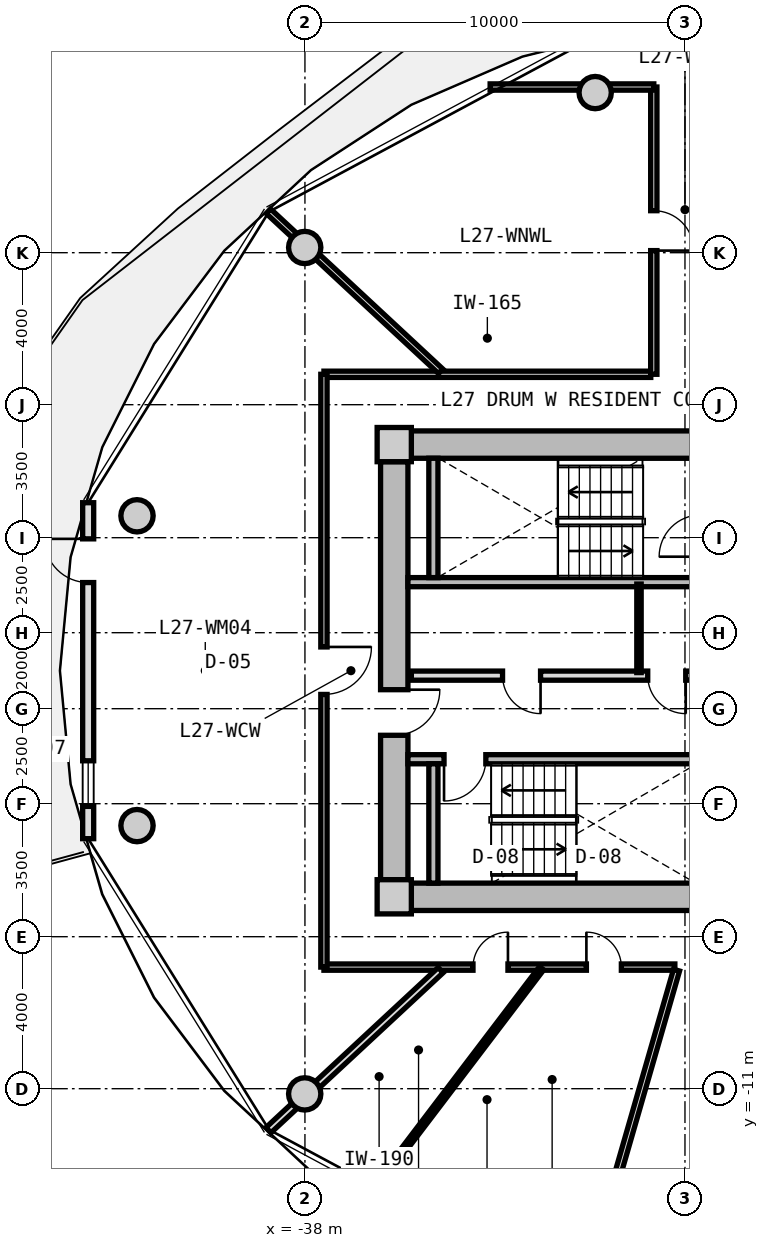
"""IFC4 building model, lengths in metres.
Left out: names, types, materials, properties, quantities, classifications, styles, units other than length and angle.
Written with IfcOpenShell. Run it as: python <this file> out.ifc"""

import sys

from ifc_helpers import new_model, si_unit, direction, frame, frame_2d, origin, origin_2d, place, context, subcontext, project, spatial, rectangle, circle, extrude, source, transform, mapped, element, fill, save


model = new_model("IFC4")
c1 = context("Model", 3, precision=1e-05, world=origin(), true_north=direction((0.0, 1.0)))
c2 = subcontext(c1, "Body", "Model", "MODEL_VIEW")
j1 = project(units=[si_unit("LENGTHUNIT", "METRE"), si_unit("PLANEANGLEUNIT", "RADIAN")], contexts=[c1])
p1 = place(None, origin())
s1 = spatial("IfcSite", under=j1, at=p1, CompositionType="ELEMENT")
p2 = place(p1, origin())
s2 = spatial("IfcBuilding", under=s1, at=p2, CompositionType="ELEMENT")
p3 = place(p2, frame((0.0, 0.0, 90.15)))
s3 = spatial("IfcBuildingStorey", under=s2, at=p3, CompositionType="ELEMENT", Elevation=90.15)
m1 = source(origin(), c2, "Body", "SweptSolid", [
    extrude(rectangle(XDim=0.9, YDim=0.9, at=origin_2d()), origin(), (0.0, 0.0, 1.0), 3.05),
])
for number, where, z_axis, x_axis in (
    (1, (-35.65, -5.95, 0.0), (0.0, 0.0, 1.0), (1.0, 0.0, 0.0)),
    (2, (-35.65, 5.95, 0.0), (0.0, 0.0, 1.0), (1.0, 0.0, 0.0)),
):
    element("IfcColumn", number, at=place(p3, frame(where, z_axis=z_axis, x_axis=x_axis)), inside=s3, PredefinedType="COLUMN", context=c2, shape_type="MappedRepresentation", body=[
        mapped(m1, transform((0.0, 0.0, 0.0), x_axis=(1.0, 0.0, 0.0), y_axis=(0.0, 1.0, 0.0), z_axis=(0.0, 0.0, 1.0), scale=1.0)),
    ])
m2 = source(origin(), c2, "Body", "SweptSolid", [
    extrude(rectangle(XDim=14.4, YDim=0.72, at=frame_2d((7.2, 0.0))), origin(), (0.0, 0.0, 1.0), 2.79),
])
for number, where, z_axis, x_axis in (
    (3, (-35.2, 5.95, 0.0), (0.0, 0.0, 1.0), (1.0, 0.0, 0.0)),
    (4, (-20.8, -5.95, 0.0), (0.0, 0.0, 1.0), (-1.0, 0.0, 0.0)),
):
    element("IfcWall", number, at=place(p3, frame(where, z_axis=z_axis, x_axis=x_axis)), inside=s3, PredefinedType="SHEAR", context=c2, shape_type="MappedRepresentation", body=[
        mapped(m2, transform((0.0, 0.0, 0.0), x_axis=(1.0, 0.0, 0.0), y_axis=(0.0, 1.0, 0.0), z_axis=(0.0, 0.0, 1.0), scale=1.0)),
    ])
m3 = source(origin(), c2, "Body", "SweptSolid", [
    extrude(rectangle(XDim=11.0, YDim=0.72, at=frame_2d((5.5, 0.0))), origin(), (0.0, 0.0, 1.0), 2.79),
])
p4 = place(p3, frame((-35.65, -5.5, 0.0), z_axis=(0.0, 0.0, 1.0), x_axis=(0.0, 1.0, 0.0)))
e5 = element("IfcWall", 5, at=p4, inside=s3, PredefinedType="SHEAR", context=c2, shape_type="MappedRepresentation", body=[
    mapped(m3, transform((0.0, 0.0, 0.0), x_axis=(1.0, 0.0, 0.0), y_axis=(0.0, 1.0, 0.0), z_axis=(0.0, 0.0, 1.0), scale=1.0)),
])
p5 = place(p4, frame((3.8, 0.0, 0.0)))
e6 = element("IfcOpeningElement", 6, at=p5, cuts=e5, PredefinedType="OPENING", context=c2, shape_type="SweptSolid", body=[
    extrude(rectangle(XDim=1.2, YDim=2.15, at=frame_2d((0.6, 1.075))), frame((0.0, 0.37, 0.0), z_axis=(0.0, -1.0, 0.0), x_axis=(1.0, 0.0, 0.0)), (0.0, 0.0, 1.0), 0.74),
])
m4 = source(origin(), c2, "Body", "SweptSolid", [
    extrude(circle(Radius=0.425, at=origin_2d()), origin(), (0.0, 0.0, 1.0), 3.05),
])
for number, where, z_axis, x_axis in (
    (7, (-30.363, 15.213, 0.0), (0.0, 0.0, 1.0), (1.0, 0.0, 0.0)),
    (8, (-38.006, 11.137, 0.0), (0.0, 0.0, 1.0), (1.0, 0.0, 0.0)),
    (9, (-42.419, 4.076, 0.0), (0.0, 0.0, 1.0), (1.0, 0.0, 0.0)),
    (10, (-42.419, -4.076, 0.0), (0.0, 0.0, 1.0), (1.0, 0.0, 0.0)),
    (11, (-38.006, -11.137, 0.0), (0.0, 0.0, 1.0), (1.0, 0.0, 0.0)),
):
    element("IfcColumn", number, at=place(p3, frame(where, z_axis=z_axis, x_axis=x_axis)), inside=s3, PredefinedType="COLUMN", context=c2, shape_type="MappedRepresentation", body=[
        mapped(m4, transform((0.0, 0.0, 0.0), x_axis=(1.0, 0.0, 0.0), y_axis=(0.0, 1.0, 0.0), z_axis=(0.0, 0.0, 1.0), scale=1.0)),
    ])
m5 = source(origin(), c2, "Body", "SweptSolid", [
    extrude(rectangle(XDim=8.841, YDim=0.29, at=frame_2d((4.421, 0.0))), origin(), (0.0, 0.0, 1.0), 2.79),
])
p6 = place(p3, frame((-43.704, -4.421, 0.0), z_axis=(0.0, 0.0, 1.0), x_axis=(0.0, 1.0, 0.0)))
e12 = element("IfcWall", 12, at=p6, inside=s3, PredefinedType="SOLIDWALL", context=c2, shape_type="MappedRepresentation", body=[
    mapped(m5, transform((0.0, 0.0, 0.0), x_axis=(1.0, 0.0, 0.0), y_axis=(0.0, 1.0, 0.0), z_axis=(0.0, 0.0, 1.0), scale=1.0)),
])
p7 = place(p6, frame((6.74, 0.0, 0.0)))
e13 = element("IfcOpeningElement", 13, at=p7, cuts=e12, PredefinedType="OPENING", context=c2, shape_type="SweptSolid", body=[
    extrude(rectangle(XDim=1.15, YDim=2.25, at=frame_2d((0.575, 1.125))), frame((0.0, 0.155, 0.0), z_axis=(0.0, -1.0, 0.0), x_axis=(1.0, 0.0, 0.0)), (0.0, 0.0, 1.0), 0.31),
])
p8 = place(p6, frame((0.85, 0.0, 0.85)))
e14 = element("IfcOpeningElement", 14, at=p8, cuts=e12, PredefinedType="OPENING", context=c2, shape_type="SweptSolid", body=[
    extrude(rectangle(XDim=1.2, YDim=1.5, at=frame_2d((0.6, 0.75))), frame((0.0, 0.155, 0.0), z_axis=(0.0, -1.0, 0.0), x_axis=(1.0, 0.0, 0.0)), (0.0, 0.0, 1.0), 0.31),
])
m6 = source(origin(), c2, "Body", "SweptSolid", [
    extrude(rectangle(XDim=7.83, YDim=0.24, at=frame_2d((3.915, 0.0))), origin(), (0.0, 0.0, 1.0), 2.79),
])
p9 = place(p3, frame((-35.29, 2.33, 0.0), z_axis=(0.0, 0.0, 1.0), x_axis=(1.0, 0.0, 0.0)))
e15 = element("IfcWall", 15, at=p9, inside=s3, PredefinedType="PARTITIONING", context=c2, shape_type="MappedRepresentation", body=[
    mapped(m6, transform((0.0, 0.0, 0.0), x_axis=(1.0, 0.0, 0.0), y_axis=(0.0, 1.0, 0.0), z_axis=(0.0, 0.0, 1.0), scale=1.0)),
])
m7 = source(origin(), c2, "Body", "SweptSolid", [
    extrude(rectangle(XDim=3.14, YDim=0.24, at=frame_2d((1.57, 0.0))), origin(), (0.0, 0.0, 1.0), 2.79),
])
p10 = place(p3, frame((-34.62, 2.45, 0.0), z_axis=(0.0, 0.0, 1.0), x_axis=(0.0, 1.0, 0.0)))
e16 = element("IfcWall", 16, at=p10, inside=s3, PredefinedType="PARTITIONING", context=c2, shape_type="MappedRepresentation", body=[
    mapped(m7, transform((0.0, 0.0, 0.0), x_axis=(1.0, 0.0, 0.0), y_axis=(0.0, 1.0, 0.0), z_axis=(0.0, 0.0, 1.0), scale=1.0)),
])
p11 = place(p3, frame((-35.29, -2.33, 0.0), z_axis=(0.0, 0.0, 1.0), x_axis=(1.0, 0.0, 0.0)))
e17 = element("IfcWall", 17, at=p11, inside=s3, PredefinedType="PARTITIONING", context=c2, shape_type="MappedRepresentation", body=[
    mapped(m6, transform((0.0, 0.0, 0.0), x_axis=(1.0, 0.0, 0.0), y_axis=(0.0, 1.0, 0.0), z_axis=(0.0, 0.0, 1.0), scale=1.0)),
])
p12 = place(p11, frame((0.95, 0.0, 0.0)))
e18 = element("IfcOpeningElement", 18, at=p12, cuts=e17, PredefinedType="OPENING", context=c2, shape_type="SweptSolid", body=[
    extrude(rectangle(XDim=1.1, YDim=2.15, at=frame_2d((0.55, 1.075))), frame((0.0, 0.13, 0.0), z_axis=(0.0, -1.0, 0.0), x_axis=(1.0, 0.0, 0.0)), (0.0, 0.0, 1.0), 0.26),
])
p13 = place(p3, frame((-34.62, -5.59, 0.0), z_axis=(0.0, 0.0, 1.0), x_axis=(0.0, 1.0, 0.0)))
e19 = element("IfcWall", 19, at=p13, inside=s3, PredefinedType="PARTITIONING", context=c2, shape_type="MappedRepresentation", body=[
    mapped(m7, transform((0.0, 0.0, 0.0), x_axis=(1.0, 0.0, 0.0), y_axis=(0.0, 1.0, 0.0), z_axis=(0.0, 0.0, 1.0), scale=1.0)),
])
m8 = source(origin(), c2, "Body", "SweptSolid", [
    extrude(rectangle(XDim=7.62, YDim=0.24, at=frame_2d((3.81, 0.0))), origin(), (0.0, 0.0, 1.0), 2.775),
])
p14 = place(p3, frame((-35.2, -0.13, 0.0), z_axis=(0.0, 0.0, 1.0), x_axis=(1.0, 0.0, 0.0)))
e20 = element("IfcWall", 20, at=p14, inside=s3, PredefinedType="PARTITIONING", context=c2, shape_type="MappedRepresentation", body=[
    mapped(m8, transform((0.0, 0.0, 0.0), x_axis=(1.0, 0.0, 0.0), y_axis=(0.0, 1.0, 0.0), z_axis=(0.0, 0.0, 1.0), scale=1.0)),
])
p15 = place(p14, frame((6.22, 0.0, 0.0)))
e21 = element("IfcOpeningElement", 21, at=p15, cuts=e20, PredefinedType="OPENING", context=c2, shape_type="SweptSolid", body=[
    extrude(rectangle(XDim=1.0, YDim=2.1, at=frame_2d((0.5, 1.05))), frame((0.0, 0.13, 0.0), z_axis=(0.0, -1.0, 0.0), x_axis=(1.0, 0.0, 0.0)), (0.0, 0.0, 1.0), 0.26),
])
p16 = place(p14, frame((2.4, 0.0, 0.0)))
e22 = element("IfcOpeningElement", 22, at=p16, cuts=e20, PredefinedType="OPENING", context=c2, shape_type="SweptSolid", body=[
    extrude(rectangle(XDim=1.0, YDim=2.1, at=frame_2d((0.5, 1.05))), frame((0.0, 0.13, 0.0), z_axis=(0.0, -1.0, 0.0), x_axis=(1.0, 0.0, 0.0)), (0.0, 0.0, 1.0), 0.26),
])
m9 = source(origin(), c2, "Body", "SweptSolid", [
    extrude(rectangle(XDim=2.33, YDim=0.115, at=frame_2d((1.165, 0.0))), origin(), (0.0, 0.0, 1.0), 2.775),
])
p17 = place(p3, frame((-29.21, -0.05, 0.0), z_axis=(0.0, 0.0, 1.0), x_axis=(0.0, 1.0, 0.0)))
e23 = element("IfcWall", 23, at=p17, inside=s3, PredefinedType="PARTITIONING", context=c2, shape_type="MappedRepresentation", body=[
    mapped(m9, transform((0.0, 0.0, 0.0), x_axis=(1.0, 0.0, 0.0), y_axis=(0.0, 1.0, 0.0), z_axis=(0.0, 0.0, 1.0), scale=1.0)),
])
m10 = source(origin(), c2, "Body", "SweptSolid", [
    extrude(rectangle(XDim=8.6, YDim=0.165, at=frame_2d((4.3, 0.0))), origin(), (0.0, 0.0, 1.0), 2.775),
])
p18 = place(p3, frame((-37.5, 7.8, 0.0), z_axis=(0.0, 0.0, 1.0), x_axis=(1.0, 0.0, 0.0)))
e24 = element("IfcWall", 24, at=p18, inside=s3, PredefinedType="PARTITIONING", context=c2, shape_type="MappedRepresentation", body=[
    mapped(m10, transform((0.0, 0.0, 0.0), x_axis=(1.0, 0.0, 0.0), y_axis=(0.0, 1.0, 0.0), z_axis=(0.0, 0.0, 1.0), scale=1.0)),
])
m11 = source(origin(), c2, "Body", "SweptSolid", [
    extrude(rectangle(XDim=9.234, YDim=0.165, at=frame_2d((4.617, 0.0))), origin(), (0.0, 0.0, 1.0), 2.775),
])
p19 = place(p3, frame((-28.266, -7.8, 0.0), z_axis=(0.0, 0.0, 1.0), x_axis=(-1.0, 0.0, 0.0)))
e25 = element("IfcWall", 25, at=p19, inside=s3, PredefinedType="PARTITIONING", context=c2, shape_type="MappedRepresentation", body=[
    mapped(m11, transform((0.0, 0.0, 0.0), x_axis=(1.0, 0.0, 0.0), y_axis=(0.0, 1.0, 0.0), z_axis=(0.0, 0.0, 1.0), scale=1.0)),
])
p20 = place(p19, frame((4.392, 0.0, 0.0)))
e26 = element("IfcOpeningElement", 26, at=p20, cuts=e25, PredefinedType="OPENING", context=c2, shape_type="SweptSolid", body=[
    extrude(rectangle(XDim=0.92, YDim=2.1, at=frame_2d((0.46, 1.05))), frame((0.0, 0.093, 0.0), z_axis=(0.0, -1.0, 0.0), x_axis=(1.0, 0.0, 0.0)), (0.0, 0.0, 1.0), 0.185),
])
p21 = place(p19, frame((1.408, 0.0, 0.0)))
e27 = element("IfcOpeningElement", 27, at=p21, cuts=e25, PredefinedType="OPENING", context=c2, shape_type="SweptSolid", body=[
    extrude(rectangle(XDim=0.92, YDim=2.1, at=frame_2d((0.46, 1.05))), frame((0.0, 0.093, 0.0), z_axis=(0.0, -1.0, 0.0), x_axis=(1.0, 0.0, 0.0)), (0.0, 0.0, 1.0), 0.185),
])
m12 = source(origin(), c2, "Body", "SweptSolid", [
    extrude(rectangle(XDim=15.6, YDim=0.165, at=frame_2d((7.8, 0.0))), origin(), (0.0, 0.0, 1.0), 2.775),
])
p22 = place(p3, frame((-37.5, -7.8, 0.0), z_axis=(0.0, 0.0, 1.0), x_axis=(0.0, 1.0, 0.0)))
e28 = element("IfcWall", 28, at=p22, inside=s3, PredefinedType="PARTITIONING", context=c2, shape_type="MappedRepresentation", body=[
    mapped(m12, transform((0.0, 0.0, 0.0), x_axis=(1.0, 0.0, 0.0), y_axis=(0.0, 1.0, 0.0), z_axis=(0.0, 0.0, 1.0), scale=1.0)),
])
p23 = place(p22, frame((7.175, 0.0, 0.0)))
e29 = element("IfcOpeningElement", 29, at=p23, cuts=e28, PredefinedType="OPENING", context=c2, shape_type="SweptSolid", body=[
    extrude(rectangle(XDim=1.25, YDim=2.2, at=frame_2d((0.625, 1.1))), frame((0.0, 0.093, 0.0), z_axis=(0.0, -1.0, 0.0), x_axis=(1.0, 0.0, 0.0)), (0.0, 0.0, 1.0), 0.185),
])
m13 = source(origin(), c2, "Body", "SweptSolid", [
    extrude(rectangle(XDim=6.187, YDim=0.165, at=frame_2d((3.093, 0.0))), origin(), (0.0, 0.0, 1.0), 2.275),
])
p24 = place(p3, frame((-34.429, 7.88, 0.0), z_axis=(0.0, 0.0, 1.0), x_axis=(-0.732501077882, 0.680765870841, 0.0)))
e30 = element("IfcWall", 30, at=p24, inside=s3, PredefinedType="PARTITIONING", context=c2, shape_type="MappedRepresentation", body=[
    mapped(m13, transform((0.0, 0.0, 0.0), x_axis=(1.0, 0.0, 0.0), y_axis=(0.0, 1.0, 0.0), z_axis=(0.0, 0.0, 1.0), scale=1.0)),
])
m14 = source(origin(), c2, "Body", "SweptSolid", [
    extrude(rectangle(XDim=8.989, YDim=0.165, at=frame_2d((4.495, 0.0))), origin(), (0.0, 0.0, 1.0), 2.275),
])
p25 = place(p3, frame((-28.222, -7.88, 0.0), z_axis=(0.0, 0.0, 1.0), x_axis=(-0.27702323008, -0.960863221274, 0.0)))
e31 = element("IfcWall", 31, at=p25, inside=s3, PredefinedType="PARTITIONING", context=c2, shape_type="MappedRepresentation", body=[
    mapped(m14, transform((0.0, 0.0, 0.0), x_axis=(1.0, 0.0, 0.0), y_axis=(0.0, 1.0, 0.0), z_axis=(0.0, 0.0, 1.0), scale=1.0)),
])
m15 = source(origin(), c2, "Body", "SweptSolid", [
    extrude(rectangle(XDim=7.56, YDim=0.165, at=frame_2d((3.78, 0.0))), origin(), (0.0, 0.0, 1.0), 2.775),
])
p26 = place(p3, frame((-28.82, 7.8, 0.0), z_axis=(0.0, 0.0, 1.0), x_axis=(0.0, 1.0, 0.0)))
e32 = element("IfcWall", 32, at=p26, inside=s3, PredefinedType="PARTITIONING", context=c2, shape_type="MappedRepresentation", body=[
    mapped(m15, transform((0.0, 0.0, 0.0), x_axis=(1.0, 0.0, 0.0), y_axis=(0.0, 1.0, 0.0), z_axis=(0.0, 0.0, 1.0), scale=1.0)),
])
p27 = place(p26, frame((3.255, 0.0, 0.0)))
e33 = element("IfcOpeningElement", 33, at=p27, cuts=e32, PredefinedType="OPENING", context=c2, shape_type="SweptSolid", body=[
    extrude(rectangle(XDim=1.05, YDim=2.15, at=frame_2d((0.525, 1.075))), frame((0.0, 0.093, 0.0), z_axis=(0.0, -1.0, 0.0), x_axis=(1.0, 0.0, 0.0)), (0.0, 0.0, 1.0), 0.185),
])
m16 = source(origin(), c2, "Body", "SweptSolid", [
    extrude(rectangle(XDim=4.307, YDim=0.165, at=frame_2d((2.153, 0.0))), origin(), (0.0, 0.0, 1.0), 2.275),
])
p28 = place(p3, frame((-33.127, 15.36, 0.0), z_axis=(0.0, 0.0, 1.0), x_axis=(1.0, 0.0, 0.0)))
e34 = element("IfcWall", 34, at=p28, inside=s3, PredefinedType="PARTITIONING", context=c2, shape_type="MappedRepresentation", body=[
    mapped(m16, transform((0.0, 0.0, 0.0), x_axis=(1.0, 0.0, 0.0), y_axis=(0.0, 1.0, 0.0), z_axis=(0.0, 0.0, 1.0), scale=1.0)),
])
m17 = source(origin(), c2, "Body", "SweptSolid", [
    extrude(rectangle(XDim=6.187, YDim=0.19, at=frame_2d((3.093, 0.0))), origin(), (0.0, 0.0, 1.0), 2.275),
])
p29 = place(p3, frame((-34.429, -7.88, 0.0), z_axis=(0.0, 0.0, 1.0), x_axis=(-0.732501077882, -0.680765870841, 0.0)))
e35 = element("IfcWall", 35, at=p29, inside=s3, PredefinedType="PARTITIONING", context=c2, shape_type="MappedRepresentation", body=[
    mapped(m17, transform((0.0, 0.0, 0.0), x_axis=(1.0, 0.0, 0.0), y_axis=(0.0, 1.0, 0.0), z_axis=(0.0, 0.0, 1.0), scale=1.0)),
])
m18 = source(origin(), c2, "Body", "SweptSolid", [
    extrude(rectangle(XDim=7.243, YDim=0.14, at=frame_2d((3.621, 0.0))), origin(), (0.0, 0.0, 1.0), 2.775),
])
p30 = place(p3, frame((-31.774, -7.83, 0.0), z_axis=(0.0, 0.0, 1.0), x_axis=(-0.605111472002, -0.796140757939, 0.0)))
e36 = element("IfcWall", 36, at=p30, inside=s3, PredefinedType="PARTITIONING", context=c2, shape_type="MappedRepresentation", body=[
    mapped(m18, transform((0.0, 0.0, 0.0), x_axis=(1.0, 0.0, 0.0), y_axis=(0.0, 1.0, 0.0), z_axis=(0.0, 0.0, 1.0), scale=1.0)),
])
m19 = source(origin(), c2, "Body", "SweptSolid", [
    extrude(rectangle(XDim=1.15, YDim=2.25, at=frame_2d((0.575, 1.125))), frame((0.0, 0.025, 0.0), z_axis=(0.0, -1.0, 0.0), x_axis=(1.0, 0.0, 0.0)), (0.0, 0.0, 1.0), 0.05),
])
p31 = place(p7, origin())
e37 = element("IfcDoor", 37, at=p31, inside=s3, OperationType="SINGLE_SWING_RIGHT", PredefinedType="DOOR", context=c2, shape_type="MappedRepresentation", body=[
    mapped(m19, transform((0.0, 0.0, 0.0), x_axis=(1.0, 0.0, 0.0), y_axis=(0.0, 1.0, 0.0), z_axis=(0.0, 0.0, 1.0), scale=1.0)),
])
fill(e13, e37)
m20 = source(origin(), c2, "Body", "SweptSolid", [
    extrude(rectangle(XDim=1.2, YDim=1.5, at=frame_2d((0.6, 0.75))), frame((0.0, 0.03, 0.0), z_axis=(0.0, -1.0, 0.0), x_axis=(1.0, 0.0, 0.0)), (0.0, 0.0, 1.0), 0.06),
])
p32 = place(p8, origin())
e38 = element("IfcWindow", 38, at=p32, inside=s3, PartitioningType="SINGLE_PANEL", PredefinedType="WINDOW", context=c2, shape_type="MappedRepresentation", body=[
    mapped(m20, transform((0.0, 0.0, 0.0), x_axis=(1.0, 0.0, 0.0), y_axis=(0.0, 1.0, 0.0), z_axis=(0.0, 0.0, 1.0), scale=1.0)),
])
fill(e14, e38)
m21 = source(origin(), c2, "Body", "SweptSolid", [
    extrude(rectangle(XDim=1.1, YDim=2.15, at=frame_2d((0.55, 1.075))), frame((0.0, 0.025, 0.0), z_axis=(0.0, -1.0, 0.0), x_axis=(1.0, 0.0, 0.0)), (0.0, 0.0, 1.0), 0.05),
])
p33 = place(p12, frame((1.1, 0.0, 0.0), z_axis=(0.0, 0.0, 1.0), x_axis=(-1.0, 0.0, 0.0)))
e39 = element("IfcDoor", 39, at=p33, inside=s3, OperationType="SINGLE_SWING_RIGHT", PredefinedType="DOOR", context=c2, shape_type="MappedRepresentation", body=[
    mapped(m21, transform((0.0, 0.0, 0.0), x_axis=(1.0, 0.0, 0.0), y_axis=(0.0, 1.0, 0.0), z_axis=(0.0, 0.0, 1.0), scale=1.0)),
])
fill(e18, e39)
m22 = source(origin(), c2, "Body", "SweptSolid", [
    extrude(rectangle(XDim=1.2, YDim=2.15, at=frame_2d((0.6, 1.075))), frame((0.0, 0.025, 0.0), z_axis=(0.0, -1.0, 0.0), x_axis=(1.0, 0.0, 0.0)), (0.0, 0.0, 1.0), 0.05),
])
p34 = place(p5, frame((1.2, 0.0, 0.0), z_axis=(0.0, 0.0, 1.0), x_axis=(-1.0, 0.0, 0.0)))
e40 = element("IfcDoor", 40, at=p34, inside=s3, OperationType="SINGLE_SWING_LEFT", PredefinedType="DOOR", context=c2, shape_type="MappedRepresentation", body=[
    mapped(m22, transform((0.0, 0.0, 0.0), x_axis=(1.0, 0.0, 0.0), y_axis=(0.0, 1.0, 0.0), z_axis=(0.0, 0.0, 1.0), scale=1.0)),
])
fill(e6, e40)
m23 = source(origin(), c2, "Body", "SweptSolid", [
    extrude(rectangle(XDim=1.0, YDim=2.1, at=frame_2d((0.5, 1.05))), frame((0.0, 0.025, 0.0), z_axis=(0.0, -1.0, 0.0), x_axis=(1.0, 0.0, 0.0)), (0.0, 0.0, 1.0), 0.05),
])
p35 = place(p15, frame((1.0, 0.0, 0.0), z_axis=(0.0, 0.0, 1.0), x_axis=(-1.0, 0.0, 0.0)))
e41 = element("IfcDoor", 41, at=p35, inside=s3, OperationType="SINGLE_SWING_LEFT", PredefinedType="DOOR", context=c2, shape_type="MappedRepresentation", body=[
    mapped(m23, transform((0.0, 0.0, 0.0), x_axis=(1.0, 0.0, 0.0), y_axis=(0.0, 1.0, 0.0), z_axis=(0.0, 0.0, 1.0), scale=1.0)),
])
fill(e21, e41)
p36 = place(p16, frame((1.0, 0.0, 0.0), z_axis=(0.0, 0.0, 1.0), x_axis=(-1.0, 0.0, 0.0)))
e42 = element("IfcDoor", 42, at=p36, inside=s3, OperationType="SINGLE_SWING_LEFT", PredefinedType="DOOR", context=c2, shape_type="MappedRepresentation", body=[
    mapped(m23, transform((0.0, 0.0, 0.0), x_axis=(1.0, 0.0, 0.0), y_axis=(0.0, 1.0, 0.0), z_axis=(0.0, 0.0, 1.0), scale=1.0)),
])
fill(e22, e42)
m24 = source(origin(), c2, "Body", "SweptSolid", [
    extrude(rectangle(XDim=1.05, YDim=2.15, at=frame_2d((0.525, 1.075))), frame((0.0, 0.025, 0.0), z_axis=(0.0, -1.0, 0.0), x_axis=(1.0, 0.0, 0.0)), (0.0, 0.0, 1.0), 0.05),
])
p37 = place(p27, frame((1.05, 0.0, 0.0), z_axis=(0.0, 0.0, 1.0), x_axis=(-1.0, 0.0, 0.0)))
e43 = element("IfcDoor", 43, at=p37, inside=s3, OperationType="SINGLE_SWING_RIGHT", PredefinedType="DOOR", context=c2, shape_type="MappedRepresentation", body=[
    mapped(m24, transform((0.0, 0.0, 0.0), x_axis=(1.0, 0.0, 0.0), y_axis=(0.0, 1.0, 0.0), z_axis=(0.0, 0.0, 1.0), scale=1.0)),
])
fill(e33, e43)
m25 = source(origin(), c2, "Body", "SweptSolid", [
    extrude(rectangle(XDim=1.25, YDim=2.2, at=frame_2d((0.625, 1.1))), frame((0.0, 0.025, 0.0), z_axis=(0.0, -1.0, 0.0), x_axis=(1.0, 0.0, 0.0)), (0.0, 0.0, 1.0), 0.05),
])
p38 = place(p23, frame((1.25, 0.0, 0.0), z_axis=(0.0, 0.0, 1.0), x_axis=(-1.0, 0.0, 0.0)))
e44 = element("IfcDoor", 44, at=p38, inside=s3, OperationType="SINGLE_SWING_LEFT", PredefinedType="DOOR", context=c2, shape_type="MappedRepresentation", body=[
    mapped(m25, transform((0.0, 0.0, 0.0), x_axis=(1.0, 0.0, 0.0), y_axis=(0.0, 1.0, 0.0), z_axis=(0.0, 0.0, 1.0), scale=1.0)),
])
fill(e29, e44)
m26 = source(origin(), c2, "Body", "SweptSolid", [
    extrude(rectangle(XDim=0.92, YDim=2.1, at=frame_2d((0.46, 1.05))), frame((0.0, 0.025, 0.0), z_axis=(0.0, -1.0, 0.0), x_axis=(1.0, 0.0, 0.0)), (0.0, 0.0, 1.0), 0.05),
])
p39 = place(p20, frame((0.92, 0.0, 0.0), z_axis=(0.0, 0.0, 1.0), x_axis=(-1.0, 0.0, 0.0)))
e45 = element("IfcDoor", 45, at=p39, inside=s3, OperationType="SINGLE_SWING_RIGHT", PredefinedType="DOOR", context=c2, shape_type="MappedRepresentation", body=[
    mapped(m26, transform((0.0, 0.0, 0.0), x_axis=(1.0, 0.0, 0.0), y_axis=(0.0, 1.0, 0.0), z_axis=(0.0, 0.0, 1.0), scale=1.0)),
])
fill(e26, e45)
p40 = place(p21, frame((0.92, 0.0, 0.0), z_axis=(0.0, 0.0, 1.0), x_axis=(-1.0, 0.0, 0.0)))
e46 = element("IfcDoor", 46, at=p40, inside=s3, OperationType="SINGLE_SWING_LEFT", PredefinedType="DOOR", context=c2, shape_type="MappedRepresentation", body=[
    mapped(m26, transform((0.0, 0.0, 0.0), x_axis=(1.0, 0.0, 0.0), y_axis=(0.0, 1.0, 0.0), z_axis=(0.0, 0.0, 1.0), scale=1.0)),
])
fill(e27, e46)
save(model, sys.argv[1])
